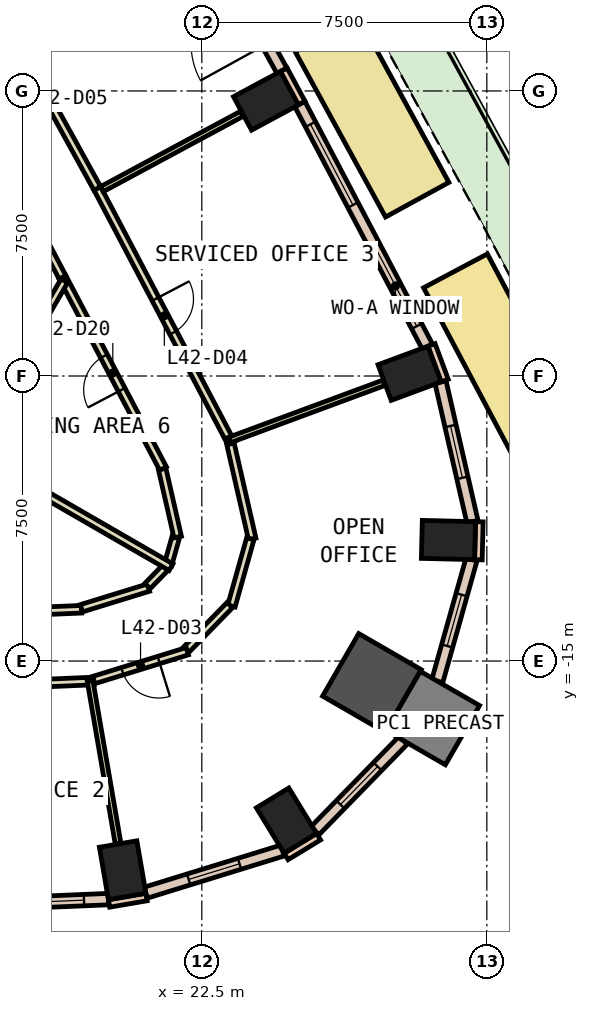
"""IFC4 building model, lengths in metres.
Left out: names, types, materials, properties, quantities, classifications, styles, units other than length and angle.
Written with IfcOpenShell. Run it as: python <this file> out.ifc"""

import sys

from ifc_helpers import new_model, si_unit, direction, frame, frame_2d, origin, origin_2d, place, context, subcontext, project, spatial, rectangle, extrude, element, fill, save


model = new_model("IFC4")
c1 = context("Model", 3, precision=1e-05, world=origin(), true_north=direction((0.0, 1.0)))
c2 = subcontext(c1, "Body", "Model", "MODEL_VIEW")
j1 = project(units=[si_unit("LENGTHUNIT", "METRE"), si_unit("PLANEANGLEUNIT", "RADIAN")], contexts=[c1])
p1 = place(None, origin())
s1 = spatial("IfcSite", under=j1, at=p1, CompositionType="ELEMENT")
p2 = place(p1, origin())
s2 = spatial("IfcBuilding", under=s1, at=p2, CompositionType="ELEMENT")
p3 = place(p2, frame((0.0, 0.0, 189.8)))
s3 = spatial("IfcBuildingStorey", under=s2, at=p3, CompositionType="ELEMENT", Elevation=189.8)
for number, where, z_axis, x_axis in (
    (1, (20.417, -20.505, 0.0), (0.0, 0.0, 1.0), (0.986, 0.169, 0.0)),
    (2, (24.728, -19.199, 0.0), (0.0, 0.0, 1.0), (0.853, 0.521, 0.0)),
):
    element("IfcColumn", number, at=place(p3, frame(where, z_axis=z_axis, x_axis=x_axis)), inside=s3, PredefinedType="COLUMN", context=c2, shape_type="SweptSolid", body=[
        extrude(rectangle(XDim=1.0, YDim=1.4, at=origin_2d()), origin(), (0.0, 0.0, 1.0), 3.8),
    ])
p4 = place(p3, frame((26.977, -15.575, 0.0), z_axis=(0.0, 0.0, 1.0), x_axis=(-0.866025403784, 0.5, 0.0)))
e3 = element("IfcColumn", 3, at=p4, inside=s3, PredefinedType="COLUMN", context=c2, shape_type="SweptSolid", body=[
    extrude(rectangle(XDim=1.9, YDim=1.9, at=origin_2d()), origin(), (0.0, 0.0, 1.0), 3.8),
])
for number, where, z_axis, x_axis in (
    (4, (28.99, -11.816, 0.0), (0.0, 0.0, 1.0), (0.025, 1.0, 0.0)),
    (5, (27.967, -7.429, 0.0), (0.0, 0.0, 1.0), (-0.347, 0.938, 0.0)),
    (6, (24.188, -0.259, 0.0), (0.0, 0.0, 1.0), (-0.474, 0.88, 0.0)),
):
    element("IfcColumn", number, at=place(p3, frame(where, z_axis=z_axis, x_axis=x_axis)), inside=s3, PredefinedType="COLUMN", context=c2, shape_type="SweptSolid", body=[
        extrude(rectangle(XDim=1.0, YDim=1.4, at=origin_2d()), origin(), (0.0, 0.0, 1.0), 3.8),
    ])
p5 = place(p3, frame((28.579, -16.5, 0.0), z_axis=(0.0, 0.0, 1.0), x_axis=(-0.866025403784, 0.5, 0.0)))
e7 = element("IfcColumn", 7, at=p5, inside=s3, PredefinedType="COLUMN", context=c2, shape_type="SweptSolid", body=[
    extrude(rectangle(XDim=1.8, YDim=1.8, at=origin_2d()), origin(), (0.0, 0.0, 1.0), 3.8),
])
p6 = place(p3, frame((28.891, -7.621, 0.0), z_axis=(0.0, 0.0, 1.0), x_axis=(-0.347107644204, 0.937825294677, 0.0)))
e8 = element("IfcWall", 8, at=p6, inside=s3, PredefinedType="STANDARD", context=c2, shape_type="SweptSolid", body=[
    extrude(rectangle(XDim=1.0, YDim=0.2, at=frame_2d((0.5, 0.0))), origin(), (0.0, 0.0, 1.0), 3.8),
])
p7 = place(p3, frame((25.129, -0.32, 0.0), z_axis=(0.0, 0.0, 1.0), x_axis=(-0.473663196434, 0.88070606694, 0.0)))
e9 = element("IfcWall", 9, at=p7, inside=s3, PredefinedType="STANDARD", context=c2, shape_type="SweptSolid", body=[
    extrude(rectangle(XDim=1.0, YDim=0.2, at=frame_2d((0.5, 0.0))), origin(), (0.0, 0.0, 1.0), 3.8),
])
p8 = place(p3, frame((20.059, -21.378, 0.0), z_axis=(0.0, 0.0, 1.0), x_axis=(0.985631544579, 0.168909615862, 0.0)))
e10 = element("IfcWall", 10, at=p8, inside=s3, PredefinedType="STANDARD", context=c2, shape_type="SweptSolid", body=[
    extrude(rectangle(XDim=1.0, YDim=0.2, at=frame_2d((0.5, 0.0))), origin(), (0.0, 0.0, 1.0), 3.8),
])
p9 = place(p3, frame((24.718, -20.142, 0.0), z_axis=(0.0, 0.0, 1.0), x_axis=(0.853679739553, 0.520798331677, 0.0)))
e11 = element("IfcWall", 11, at=p9, inside=s3, PredefinedType="STANDARD", context=c2, shape_type="SweptSolid", body=[
    extrude(rectangle(XDim=1.0, YDim=0.2, at=frame_2d((0.5, 0.0))), origin(), (0.0, 0.0, 1.0), 3.8),
])
p10 = place(p3, frame((29.778, -12.335, 0.0), z_axis=(0.0, 0.0, 1.0), x_axis=(0.023942303888, 0.999713341956, 0.0)))
e12 = element("IfcWall", 12, at=p10, inside=s3, PredefinedType="STANDARD", context=c2, shape_type="SweptSolid", body=[
    extrude(rectangle(XDim=0.999, YDim=0.2, at=frame_2d((0.5, 0.0))), origin(), (0.0, 0.0, 1.0), 3.8),
])
p11 = place(p3, frame((14.678, -21.488, 0.0), z_axis=(0.0, 0.0, 1.0), x_axis=(0.999127941775, 0.041753514387, 0.0)))
e13 = element("IfcWall", 13, at=p11, inside=s3, PredefinedType="STANDARD", context=c2, shape_type="SweptSolid", body=[
    extrude(rectangle(XDim=5.368, YDim=0.3, at=frame_2d((2.684, 0.0))), origin(), (0.0, 0.0, 1.0), 3.8),
])
p12 = place(p11, frame((0.642, 0.0, 0.9)))
e14 = element("IfcOpeningElement", 14, at=p12, cuts=e13, PredefinedType="OPENING", context=c2, shape_type="SweptSolid", body=[
    extrude(rectangle(XDim=1.4, YDim=2.6, at=frame_2d((0.7, 1.3))), frame((0.0, 0.16, 0.0), z_axis=(0.0, -1.0, 0.0), x_axis=(1.0, 0.0, 0.0)), (0.0, 0.0, 1.0), 0.32),
])
p13 = place(p11, frame((3.326, 0.0, 0.9)))
e15 = element("IfcOpeningElement", 15, at=p13, cuts=e13, PredefinedType="OPENING", context=c2, shape_type="SweptSolid", body=[
    extrude(rectangle(XDim=1.4, YDim=2.6, at=frame_2d((0.7, 1.3))), frame((0.0, 0.16, 0.0), z_axis=(0.0, -1.0, 0.0), x_axis=(1.0, 0.0, 0.0)), (0.0, 0.0, 1.0), 0.32),
])
p14 = place(p3, frame((21.024, -21.095, 0.0), z_axis=(0.0, 0.0, 1.0), x_axis=(0.955692086233, 0.29436819854, 0.0)))
e16 = element("IfcWall", 16, at=p14, inside=s3, PredefinedType="STANDARD", context=c2, shape_type="SweptSolid", body=[
    extrude(rectangle(XDim=3.767, YDim=0.3, at=frame_2d((1.884, 0.0))), origin(), (0.0, 0.0, 1.0), 3.8),
])
p15 = place(p14, frame((1.183, 0.0, 0.9)))
e17 = element("IfcOpeningElement", 17, at=p15, cuts=e16, PredefinedType="OPENING", context=c2, shape_type="SweptSolid", body=[
    extrude(rectangle(XDim=1.4, YDim=2.6, at=frame_2d((0.7, 1.3))), frame((0.0, 0.16, 0.0), z_axis=(0.0, -1.0, 0.0), x_axis=(1.0, 0.0, 0.0)), (0.0, 0.0, 1.0), 0.32),
])
p16 = place(p3, frame((25.476, -19.466, 0.0), z_axis=(0.0, 0.0, 1.0), x_axis=(0.698311919602, 0.71579358962, 0.0)))
e18 = element("IfcWall", 18, at=p16, inside=s3, PredefinedType="STANDARD", context=c2, shape_type="SweptSolid", body=[
    extrude(rectangle(XDim=3.324, YDim=0.3, at=frame_2d((1.662, 0.0))), origin(), (0.0, 0.0, 1.0), 3.8),
])
p17 = place(p16, frame((0.962, 0.0, 0.9)))
e19 = element("IfcOpeningElement", 19, at=p17, cuts=e18, PredefinedType="OPENING", context=c2, shape_type="SweptSolid", body=[
    extrude(rectangle(XDim=1.4, YDim=2.6, at=frame_2d((0.7, 1.3))), frame((0.0, 0.16, 0.0), z_axis=(0.0, -1.0, 0.0), x_axis=(1.0, 0.0, 0.0)), (0.0, 0.0, 1.0), 0.32),
])
p18 = place(p3, frame((28.696, -15.529, 0.0), z_axis=(0.0, 0.0, 1.0), x_axis=(0.270798765166, 0.962635979374, 0.0)))
e20 = element("IfcWall", 20, at=p18, inside=s3, PredefinedType="STANDARD", context=c2, shape_type="SweptSolid", body=[
    extrude(rectangle(XDim=3.323, YDim=0.3, at=frame_2d((1.662, 0.0))), origin(), (0.0, 0.0, 1.0), 3.8),
])
p19 = place(p18, frame((0.962, 0.0, 0.9)))
e21 = element("IfcOpeningElement", 21, at=p19, cuts=e20, PredefinedType="OPENING", context=c2, shape_type="SweptSolid", body=[
    extrude(rectangle(XDim=1.4, YDim=2.6, at=frame_2d((0.7, 1.3))), frame((0.0, 0.16, 0.0), z_axis=(0.0, -1.0, 0.0), x_axis=(1.0, 0.0, 0.0)), (0.0, 0.0, 1.0), 0.32),
])
p20 = place(p3, frame((29.621, -11.332, 0.0), z_axis=(0.0, 0.0, 1.0), x_axis=(-0.223013094864, 0.974815448954, 0.0)))
e22 = element("IfcWall", 22, at=p20, inside=s3, PredefinedType="STANDARD", context=c2, shape_type="SweptSolid", body=[
    extrude(rectangle(XDim=3.767, YDim=0.3, at=frame_2d((1.884, 0.0))), origin(), (0.0, 0.0, 1.0), 3.8),
])
p21 = place(p20, frame((1.183, 0.0, 0.9)))
e23 = element("IfcOpeningElement", 23, at=p21, cuts=e22, PredefinedType="OPENING", context=c2, shape_type="SweptSolid", body=[
    extrude(rectangle(XDim=1.4, YDim=2.6, at=frame_2d((0.7, 1.3))), frame((0.0, 0.16, 0.0), z_axis=(0.0, -1.0, 0.0), x_axis=(1.0, 0.0, 0.0)), (0.0, 0.0, 1.0), 0.32),
])
p22 = place(p3, frame((28.435, -6.724, 0.0), z_axis=(0.0, 0.0, 1.0), x_axis=(-0.465478369088, 0.885059256723, 0.0)))
e24 = element("IfcWall", 24, at=p22, inside=s3, PredefinedType="STANDARD", context=c2, shape_type="SweptSolid", body=[
    extrude(rectangle(XDim=7.208, YDim=0.3, at=frame_2d((3.604, 0.0))), origin(), (0.0, 0.0, 1.0), 3.8),
])
p23 = place(p22, frame((0.602, 0.0, 0.9)))
e25 = element("IfcOpeningElement", 25, at=p23, cuts=e24, PredefinedType="OPENING", context=c2, shape_type="SweptSolid", body=[
    extrude(rectangle(XDim=2.4, YDim=2.6, at=frame_2d((1.2, 1.3))), frame((0.0, 0.16, 0.0), z_axis=(0.0, -1.0, 0.0), x_axis=(1.0, 0.0, 0.0)), (0.0, 0.0, 1.0), 0.32),
])
p24 = place(p22, frame((4.206, 0.0, 0.9)))
e26 = element("IfcOpeningElement", 26, at=p24, cuts=e24, PredefinedType="OPENING", context=c2, shape_type="SweptSolid", body=[
    extrude(rectangle(XDim=2.4, YDim=2.6, at=frame_2d((1.2, 1.3))), frame((0.0, 0.16, 0.0), z_axis=(0.0, -1.0, 0.0), x_axis=(1.0, 0.0, 0.0)), (0.0, 0.0, 1.0), 0.32),
])
p25 = place(p3, frame((24.607, 0.534, 0.0), z_axis=(0.0, 0.0, 1.0), x_axis=(-0.482862185961, 0.875696356832, 0.0)))
e27 = element("IfcWall", 27, at=p25, inside=s3, PredefinedType="STANDARD", context=c2, shape_type="SweptSolid", body=[
    extrude(rectangle(XDim=7.23, YDim=0.3, at=frame_2d((3.615, 0.0))), origin(), (0.0, 0.0, 1.0), 3.8),
])
p26 = place(p25, frame((0.807, 0.0, 0.0)))
e28 = element("IfcOpeningElement", 28, at=p26, cuts=e27, PredefinedType="OPENING", context=c2, shape_type="SweptSolid", body=[
    extrude(rectangle(XDim=2.0, YDim=2.4, at=frame_2d((1.0, 1.2))), frame((0.0, 0.16, 0.0), z_axis=(0.0, -1.0, 0.0), x_axis=(1.0, 0.0, 0.0)), (0.0, 0.0, 1.0), 0.32),
])
p27 = place(p25, frame((4.222, 0.0, 0.9)))
e29 = element("IfcOpeningElement", 29, at=p27, cuts=e27, PredefinedType="OPENING", context=c2, shape_type="SweptSolid", body=[
    extrude(rectangle(XDim=2.4, YDim=2.6, at=frame_2d((1.2, 1.3))), frame((0.0, 0.16, 0.0), z_axis=(0.0, -1.0, 0.0), x_axis=(1.0, 0.0, 0.0)), (0.0, 0.0, 1.0), 0.32),
])
p28 = place(p3, frame((31.572, -9.251, 0.0), z_axis=(0.0, 0.0, 1.0), x_axis=(-0.468659554366, 0.883378866683, 0.0)))
e30 = element("IfcWall", 30, at=p28, inside=s3, PredefinedType="STANDARD", context=c2, shape_type="SweptSolid", body=[
    extrude(rectangle(XDim=5.115, YDim=1.9, at=frame_2d((2.557, 0.0))), origin(), (0.0, 0.0, 1.0), 0.8),
])
p29 = place(p3, frame((28.168, -2.861, 0.0), z_axis=(0.0, 0.0, 1.0), x_axis=(-0.479445954257, 0.87757140846, 0.0)))
e31 = element("IfcWall", 31, at=p29, inside=s3, PredefinedType="STANDARD", context=c2, shape_type="SweptSolid", body=[
    extrude(rectangle(XDim=4.954, YDim=1.9, at=frame_2d((2.477, 0.0))), origin(), (0.0, 0.0, 1.0), 0.8),
])
p30 = place(p3, frame((18.836, -4.906, 0.0), z_axis=(0.0, 0.0, 1.0), x_axis=(-0.465843561357, 0.884867095299, 0.0)))
e32 = element("IfcWall", 32, at=p30, inside=s3, PredefinedType="PARTITIONING", context=c2, shape_type="SweptSolid", body=[
    extrude(rectangle(XDim=1.554, YDim=0.2, at=frame_2d((0.777, 0.0))), origin(), (0.0, 0.0, 1.0), 3.8),
])
p31 = place(p3, frame((13.919, -13.863, 0.0), z_axis=(0.0, 0.0, 1.0), x_axis=(0.999130261307, 0.041697972867, 0.0)))
e33 = element("IfcWall", 33, at=p31, inside=s3, PredefinedType="PARTITIONING", context=c2, shape_type="SweptSolid", body=[
    extrude(rectangle(XDim=5.422, YDim=0.2, at=frame_2d((2.711, 0.0))), origin(), (0.0, 0.0, 1.0), 3.8),
])
p32 = place(p31, frame((2.211, 0.0, 0.0)))
e34 = element("IfcOpeningElement", 34, at=p32, cuts=e33, PredefinedType="OPENING", context=c2, shape_type="SweptSolid", body=[
    extrude(rectangle(XDim=1.0, YDim=2.1, at=frame_2d((0.5, 1.05))), frame((0.0, 0.11, 0.0), z_axis=(0.0, -1.0, 0.0), x_axis=(1.0, 0.0, 0.0)), (0.0, 0.0, 1.0), 0.22),
])
p33 = place(p3, frame((19.332, -13.611, 0.0), z_axis=(0.0, 0.0, 1.0), x_axis=(0.955790442908, 0.294048685161, 0.0)))
e35 = element("IfcWall", 35, at=p33, inside=s3, PredefinedType="PARTITIONING", context=c2, shape_type="SweptSolid", body=[
    extrude(rectangle(XDim=1.846, YDim=0.2, at=frame_2d((0.923, 0.0))), origin(), (0.0, 0.0, 1.0), 3.8),
])
p34 = place(p3, frame((21.072, -13.026, 0.0), z_axis=(0.0, 0.0, 1.0), x_axis=(0.697252405765, 0.716825698936, 0.0)))
e36 = element("IfcWall", 36, at=p34, inside=s3, PredefinedType="PARTITIONING", context=c2, shape_type="SweptSolid", body=[
    extrude(rectangle(XDim=0.661, YDim=0.2, at=frame_2d((0.331, 0.0))), origin(), (0.0, 0.0, 1.0), 3.8),
])
p35 = place(p3, frame((21.608, -12.476, 0.0), z_axis=(0.0, 0.0, 1.0), x_axis=(0.270277025631, 0.962782597171, 0.0)))
e37 = element("IfcWall", 37, at=p35, inside=s3, PredefinedType="PARTITIONING", context=c2, shape_type="SweptSolid", body=[
    extrude(rectangle(XDim=0.77, YDim=0.2, at=frame_2d((0.385, 0.0))), origin(), (0.0, 0.0, 1.0), 3.8),
])
p36 = place(p3, frame((21.866, -11.737, 0.0), z_axis=(0.0, 0.0, 1.0), x_axis=(-0.222871656966, 0.974847795567, 0.0)))
e38 = element("IfcWall", 38, at=p36, inside=s3, PredefinedType="PARTITIONING", context=c2, shape_type="SweptSolid", body=[
    extrude(rectangle(XDim=1.839, YDim=0.2, at=frame_2d((0.919, 0.0))), origin(), (0.0, 0.0, 1.0), 3.8),
])
p37 = place(p3, frame((21.48, -9.935, 0.0), z_axis=(0.0, 0.0, 1.0), x_axis=(-0.465356775138, 0.885123195851, 0.0)))
e39 = element("IfcWall", 39, at=p37, inside=s3, PredefinedType="PARTITIONING", context=c2, shape_type="SweptSolid", body=[
    extrude(rectangle(XDim=5.682, YDim=0.2, at=frame_2d((2.841, 0.0))), origin(), (0.0, 0.0, 1.0), 3.8),
])
p38 = place(p37, frame((2.341, 0.0, 0.0)))
e40 = element("IfcOpeningElement", 40, at=p38, cuts=e39, PredefinedType="OPENING", context=c2, shape_type="SweptSolid", body=[
    extrude(rectangle(XDim=1.0, YDim=2.1, at=frame_2d((0.5, 1.05))), frame((0.0, 0.11, 0.0), z_axis=(0.0, -1.0, 0.0), x_axis=(1.0, 0.0, 0.0)), (0.0, 0.0, 1.0), 0.22),
])
p39 = place(p3, frame((19.661, -15.525, 0.0), z_axis=(0.0, 0.0, 1.0), x_axis=(-0.999127706659, -0.041759140148, 0.0)))
e41 = element("IfcWall", 41, at=p39, inside=s3, PredefinedType="PARTITIONING", context=c2, shape_type="SweptSolid", body=[
    extrude(rectangle(XDim=5.607, YDim=0.2, at=frame_2d((2.803, 0.0))), origin(), (0.0, 0.0, 1.0), 3.8),
])
p40 = place(p39, frame((2.378, 0.0, 0.0)))
e42 = element("IfcOpeningElement", 42, at=p40, cuts=e41, PredefinedType="OPENING", context=c2, shape_type="SweptSolid", body=[
    extrude(rectangle(XDim=1.0, YDim=2.1, at=frame_2d((0.5, 1.05))), frame((0.0, 0.11, 0.0), z_axis=(0.0, -1.0, 0.0), x_axis=(1.0, 0.0, 0.0)), (0.0, 0.0, 1.0), 0.22),
])
p41 = place(p3, frame((23.253, -9.279, 0.0), z_axis=(0.0, 0.0, 1.0), x_axis=(0.222909903746, -0.974839050722, 0.0)))
e43 = element("IfcWall", 43, at=p41, inside=s3, PredefinedType="PARTITIONING", context=c2, shape_type="SweptSolid", body=[
    extrude(rectangle(XDim=2.571, YDim=0.2, at=frame_2d((1.285, 0.0))), origin(), (0.0, 0.0, 1.0), 3.8),
])
p42 = place(p3, frame((23.776, -11.784, 0.0), z_axis=(0.0, 0.0, 1.0), x_axis=(-0.270522287318, -0.962713712411, 0.0)))
e44 = element("IfcWall", 44, at=p42, inside=s3, PredefinedType="PARTITIONING", context=c2, shape_type="SweptSolid", body=[
    extrude(rectangle(XDim=1.836, YDim=0.2, at=frame_2d((0.918, 0.0))), origin(), (0.0, 0.0, 1.0), 3.8),
])
p43 = place(p3, frame((23.236, -13.528, 0.0), z_axis=(0.0, 0.0, 1.0), x_axis=(-0.698551276451, -0.715560000397, 0.0)))
e45 = element("IfcWall", 45, at=p43, inside=s3, PredefinedType="PARTITIONING", context=c2, shape_type="SweptSolid", body=[
    extrude(rectangle(XDim=1.636, YDim=0.2, at=frame_2d((0.818, 0.0))), origin(), (0.0, 0.0, 1.0), 3.8),
])
p44 = place(p3, frame((22.119, -14.741, 0.0), z_axis=(0.0, 0.0, 1.0), x_axis=(-0.955612889251, -0.294625195625, 0.0)))
e46 = element("IfcWall", 46, at=p44, inside=s3, PredefinedType="PARTITIONING", context=c2, shape_type="SweptSolid", body=[
    extrude(rectangle(XDim=2.576, YDim=0.2, at=frame_2d((1.288, 0.0))), origin(), (0.0, 0.0, 1.0), 3.8),
])
p45 = place(p44, frame((0.788, 0.0, 0.0)))
e47 = element("IfcOpeningElement", 47, at=p45, cuts=e46, PredefinedType="OPENING", context=c2, shape_type="SweptSolid", body=[
    extrude(rectangle(XDim=1.0, YDim=2.1, at=frame_2d((0.5, 1.05))), frame((0.0, 0.11, 0.0), z_axis=(0.0, -1.0, 0.0), x_axis=(1.0, 0.0, 0.0)), (0.0, 0.0, 1.0), 0.22),
])
p46 = place(p3, frame((19.75, -2.563, 0.0), z_axis=(0.0, 0.0, 1.0), x_axis=(0.465444987791, -0.885076812113, 0.0)))
e48 = element("IfcWall", 48, at=p46, inside=s3, PredefinedType="PARTITIONING", context=c2, shape_type="SweptSolid", body=[
    extrude(rectangle(XDim=7.578, YDim=0.2, at=frame_2d((3.789, 0.0))), origin(), (0.0, 0.0, 1.0), 3.8),
])
p47 = place(p46, frame((3.289, 0.0, 0.0)))
e49 = element("IfcOpeningElement", 49, at=p47, cuts=e48, PredefinedType="OPENING", context=c2, shape_type="SweptSolid", body=[
    extrude(rectangle(XDim=1.0, YDim=2.1, at=frame_2d((0.5, 1.05))), frame((0.0, 0.11, 0.0), z_axis=(0.0, -1.0, 0.0), x_axis=(1.0, 0.0, 0.0)), (0.0, 0.0, 1.0), 0.22),
])
p48 = place(p3, frame((15.831, 4.542, 0.0), z_axis=(0.0, 0.0, 1.0), x_axis=(0.482835531749, -0.875711053533, 0.0)))
e50 = element("IfcWall", 50, at=p48, inside=s3, PredefinedType="PARTITIONING", context=c2, shape_type="SweptSolid", body=[
    extrude(rectangle(XDim=8.115, YDim=0.2, at=frame_2d((4.057, 0.0))), origin(), (0.0, 0.0, 1.0), 3.8),
])
p49 = place(p48, frame((3.632, 0.0, 0.0)))
e51 = element("IfcOpeningElement", 51, at=p49, cuts=e50, PredefinedType="OPENING", context=c2, shape_type="SweptSolid", body=[
    extrude(rectangle(XDim=1.0, YDim=2.1, at=frame_2d((0.5, 1.05))), frame((0.0, 0.11, 0.0), z_axis=(0.0, -1.0, 0.0), x_axis=(1.0, 0.0, 0.0)), (0.0, 0.0, 1.0), 0.22),
])
p50 = place(p3, frame((18.882, -4.995, 0.0), z_axis=(0.0, 0.0, 1.0), x_axis=(-0.499895813511, -0.866085547527, 0.0)))
e52 = element("IfcWall", 52, at=p50, inside=s3, PredefinedType="PARTITIONING", context=c2, shape_type="SweptSolid", body=[
    extrude(rectangle(XDim=4.145, YDim=0.2, at=frame_2d((2.073, 0.0))), origin(), (0.0, 0.0, 1.0), 3.8),
])
p51 = place(p3, frame((16.667, -9.631, 0.0), z_axis=(0.0, 0.0, 1.0), x_axis=(0.866032775405, -0.499987231761, 0.0)))
e53 = element("IfcWall", 53, at=p51, inside=s3, PredefinedType="PARTITIONING", context=c2, shape_type="SweptSolid", body=[
    extrude(rectangle(XDim=5.8, YDim=0.2, at=frame_2d((2.9, 0.0))), origin(), (0.0, 0.0, 1.0), 3.8),
])
p52 = place(p3, frame((19.561, -15.529, 0.0), z_axis=(0.0, 0.0, 1.0), x_axis=(0.169546150064, -0.98552224886, 0.0)))
e54 = element("IfcWall", 54, at=p52, inside=s3, PredefinedType="PARTITIONING", context=c2, shape_type="SweptSolid", body=[
    extrude(rectangle(XDim=4.329, YDim=0.15, at=frame_2d((2.164, 0.0))), origin(), (0.0, 0.0, 1.0), 3.8),
])
p53 = place(p3, frame((23.231, -9.182, 0.0), z_axis=(0.0, 0.0, 1.0), x_axis=(0.937835784628, 0.34707930084, 0.0)))
e55 = element("IfcWall", 55, at=p53, inside=s3, PredefinedType="PARTITIONING", context=c2, shape_type="SweptSolid", body=[
    extrude(rectangle(XDim=4.33, YDim=0.15, at=frame_2d((2.165, 0.0))), origin(), (0.0, 0.0, 1.0), 3.8),
])
p54 = place(p3, frame((19.873, -2.582, 0.0), z_axis=(0.0, 0.0, 1.0), x_axis=(0.880480475723, 0.474082410421, 0.0)))
e56 = element("IfcWall", 56, at=p54, inside=s3, PredefinedType="PARTITIONING", context=c2, shape_type="SweptSolid", body=[
    extrude(rectangle(XDim=4.181, YDim=0.15, at=frame_2d((2.09, 0.0))), origin(), (0.0, 0.0, 1.0), 3.8),
])
p55 = place(p13, origin())
e57 = element("IfcWindow", 57, at=p55, inside=s3, PartitioningType="SINGLE_PANEL", PredefinedType="WINDOW", context=c2, shape_type="SweptSolid", body=[
    extrude(rectangle(XDim=1.4, YDim=2.6, at=frame_2d((0.7, 1.3))), frame((0.0, 0.03, 0.0), z_axis=(0.0, -1.0, 0.0), x_axis=(1.0, 0.0, 0.0)), (0.0, 0.0, 1.0), 0.06),
])
fill(e15, e57)
p56 = place(p15, origin())
e58 = element("IfcWindow", 58, at=p56, inside=s3, PartitioningType="SINGLE_PANEL", PredefinedType="WINDOW", context=c2, shape_type="SweptSolid", body=[
    extrude(rectangle(XDim=1.4, YDim=2.6, at=frame_2d((0.7, 1.3))), frame((0.0, 0.03, 0.0), z_axis=(0.0, -1.0, 0.0), x_axis=(1.0, 0.0, 0.0)), (0.0, 0.0, 1.0), 0.06),
])
fill(e17, e58)
p57 = place(p17, origin())
e59 = element("IfcWindow", 59, at=p57, inside=s3, PartitioningType="SINGLE_PANEL", PredefinedType="WINDOW", context=c2, shape_type="SweptSolid", body=[
    extrude(rectangle(XDim=1.4, YDim=2.6, at=frame_2d((0.7, 1.3))), frame((0.0, 0.03, 0.0), z_axis=(0.0, -1.0, 0.0), x_axis=(1.0, 0.0, 0.0)), (0.0, 0.0, 1.0), 0.06),
])
fill(e19, e59)
p58 = place(p19, origin())
e60 = element("IfcWindow", 60, at=p58, inside=s3, PartitioningType="SINGLE_PANEL", PredefinedType="WINDOW", context=c2, shape_type="SweptSolid", body=[
    extrude(rectangle(XDim=1.4, YDim=2.6, at=frame_2d((0.7, 1.3))), frame((0.0, 0.03, 0.0), z_axis=(0.0, -1.0, 0.0), x_axis=(1.0, 0.0, 0.0)), (0.0, 0.0, 1.0), 0.06),
])
fill(e21, e60)
p59 = place(p21, origin())
e61 = element("IfcWindow", 61, at=p59, inside=s3, PartitioningType="SINGLE_PANEL", PredefinedType="WINDOW", context=c2, shape_type="SweptSolid", body=[
    extrude(rectangle(XDim=1.4, YDim=2.6, at=frame_2d((0.7, 1.3))), frame((0.0, 0.03, 0.0), z_axis=(0.0, -1.0, 0.0), x_axis=(1.0, 0.0, 0.0)), (0.0, 0.0, 1.0), 0.06),
])
fill(e23, e61)
p60 = place(p23, origin())
e62 = element("IfcWindow", 62, at=p60, inside=s3, PartitioningType="SINGLE_PANEL", PredefinedType="WINDOW", context=c2, shape_type="SweptSolid", body=[
    extrude(rectangle(XDim=2.4, YDim=2.6, at=frame_2d((1.2, 1.3))), frame((0.0, 0.03, 0.0), z_axis=(0.0, -1.0, 0.0), x_axis=(1.0, 0.0, 0.0)), (0.0, 0.0, 1.0), 0.06),
])
fill(e25, e62)
p61 = place(p24, origin())
e63 = element("IfcWindow", 63, at=p61, inside=s3, PartitioningType="SINGLE_PANEL", PredefinedType="WINDOW", context=c2, shape_type="SweptSolid", body=[
    extrude(rectangle(XDim=2.4, YDim=2.6, at=frame_2d((1.2, 1.3))), frame((0.0, 0.03, 0.0), z_axis=(0.0, -1.0, 0.0), x_axis=(1.0, 0.0, 0.0)), (0.0, 0.0, 1.0), 0.06),
])
fill(e26, e63)
p62 = place(p45, origin())
e64 = element("IfcDoor", 64, at=p62, inside=s3, OperationType="SINGLE_SWING_LEFT", PredefinedType="DOOR", context=c2, shape_type="SweptSolid", body=[
    extrude(rectangle(XDim=1.0, YDim=2.1, at=frame_2d((0.5, 1.05))), frame((0.0, 0.025, 0.0), z_axis=(0.0, -1.0, 0.0), x_axis=(1.0, 0.0, 0.0)), (0.0, 0.0, 1.0), 0.05),
])
fill(e47, e64)
p63 = place(p47, origin())
e65 = element("IfcDoor", 65, at=p63, inside=s3, OperationType="SINGLE_SWING_LEFT", PredefinedType="DOOR", context=c2, shape_type="SweptSolid", body=[
    extrude(rectangle(XDim=1.0, YDim=2.1, at=frame_2d((0.5, 1.05))), frame((0.0, 0.025, 0.0), z_axis=(0.0, -1.0, 0.0), x_axis=(1.0, 0.0, 0.0)), (0.0, 0.0, 1.0), 0.05),
])
fill(e49, e65)
p64 = place(p38, origin())
e66 = element("IfcDoor", 66, at=p64, inside=s3, OperationType="SINGLE_SWING_LEFT", PredefinedType="DOOR", context=c2, shape_type="SweptSolid", body=[
    extrude(rectangle(XDim=1.0, YDim=2.1, at=frame_2d((0.5, 1.05))), frame((0.0, 0.025, 0.0), z_axis=(0.0, -1.0, 0.0), x_axis=(1.0, 0.0, 0.0)), (0.0, 0.0, 1.0), 0.05),
])
fill(e40, e66)
save(model, sys.argv[1])
